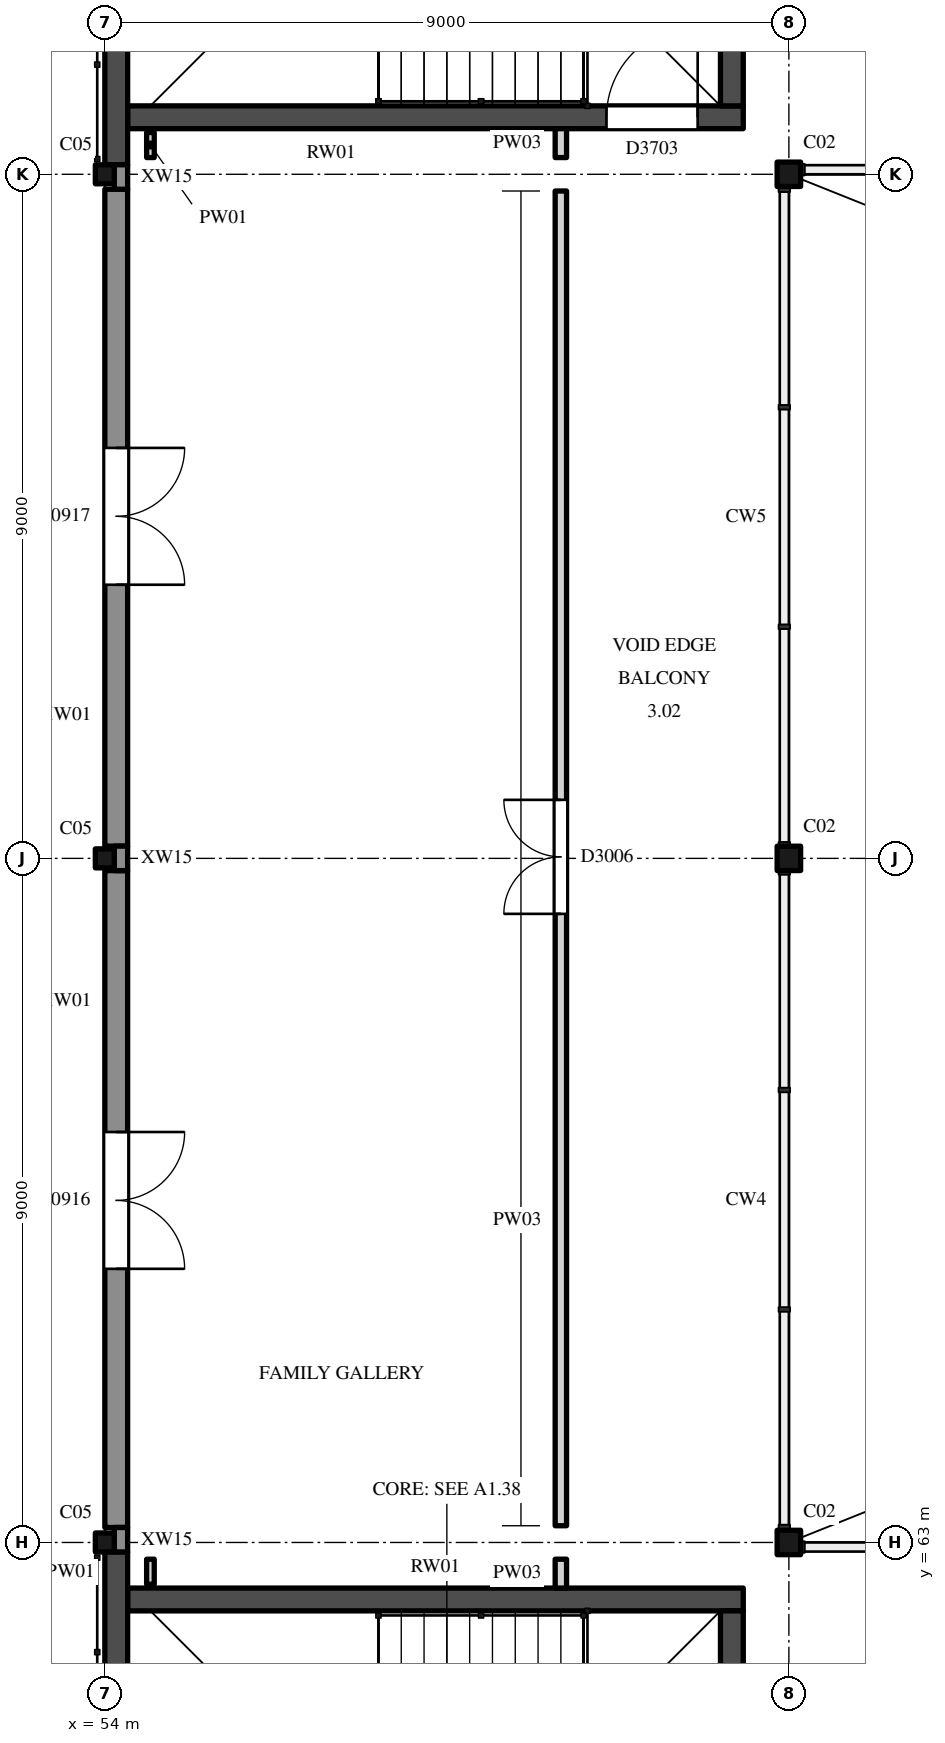
"""IFC4 building model, lengths in metres.
Left out: names, types, materials, properties, quantities, classifications, styles, units other than length and angle.
Written with IfcOpenShell. Run it as: python <this file> out.ifc"""

import sys

from ifc_helpers import new_model, si_unit, direction, frame, frame_2d, origin, origin_2d, place, context, subcontext, project, spatial, rectangle, hollow_rectangle, i_section, extrude, element, fill, save


model = new_model("IFC4")
c1 = context("Model", 3, precision=1e-05, world=origin(), true_north=direction((0.0, 1.0)))
c2 = subcontext(c1, "Body", "Model", "MODEL_VIEW")
j1 = project(units=[si_unit("LENGTHUNIT", "METRE"), si_unit("PLANEANGLEUNIT", "RADIAN")], contexts=[c1])
p1 = place(None, origin())
s1 = spatial("IfcSite", under=j1, at=p1, CompositionType="ELEMENT")
p2 = place(p1, origin())
s2 = spatial("IfcBuilding", under=s1, at=p2, CompositionType="ELEMENT")
p3 = place(p2, frame((0.0, 0.0, 16.0)))
s3 = spatial("IfcBuildingStorey", under=s2, at=p3, CompositionType="ELEMENT", Elevation=16.0)
p4 = place(p3, frame((54.0, 63.0, 0.0), z_axis=(0.0, 0.0, 1.0), x_axis=(1.0, 0.0, 0.0)))
e1 = element("IfcColumn", 1, at=p4, inside=s3, PredefinedType="COLUMN", context=c2, shape_type="SweptSolid", body=[
    extrude(hollow_rectangle(XDim=0.25, YDim=0.25, WallThickness=0.012, InnerFilletRadius=0.019, OuterFilletRadius=0.031, at=origin_2d()), origin(), (0.0, 0.0, 1.0), 10.0),
])
p5 = place(p3, frame((63.0, 63.0, 0.0), z_axis=(0.0, 0.0, 1.0), x_axis=(1.0, 0.0, 0.0)))
e2 = element("IfcColumn", 2, at=p5, inside=s3, PredefinedType="COLUMN", context=c2, shape_type="SweptSolid", body=[
    extrude(i_section(OverallWidth=0.309, OverallDepth=0.321, WebThickness=0.014, FlangeThickness=0.022, FilletRadius=0.017, at=origin_2d()), origin(), (0.0, 0.0, 1.0), 10.0),
])
p6 = place(p3, frame((54.0, 72.0, 0.0), z_axis=(0.0, 0.0, 1.0), x_axis=(1.0, 0.0, 0.0)))
e3 = element("IfcColumn", 3, at=p6, inside=s3, PredefinedType="COLUMN", context=c2, shape_type="SweptSolid", body=[
    extrude(hollow_rectangle(XDim=0.25, YDim=0.25, WallThickness=0.012, InnerFilletRadius=0.019, OuterFilletRadius=0.031, at=origin_2d()), origin(), (0.0, 0.0, 1.0), 10.0),
])
p7 = place(p3, frame((63.0, 72.0, 0.0), z_axis=(0.0, 0.0, 1.0), x_axis=(1.0, 0.0, 0.0)))
e4 = element("IfcColumn", 4, at=p7, inside=s3, PredefinedType="COLUMN", context=c2, shape_type="SweptSolid", body=[
    extrude(i_section(OverallWidth=0.309, OverallDepth=0.321, WebThickness=0.014, FlangeThickness=0.022, FilletRadius=0.017, at=origin_2d()), origin(), (0.0, 0.0, 1.0), 10.0),
])
p8 = place(p3, frame((54.0, 81.0, 0.0), z_axis=(0.0, 0.0, 1.0), x_axis=(1.0, 0.0, 0.0)))
e5 = element("IfcColumn", 5, at=p8, inside=s3, PredefinedType="COLUMN", context=c2, shape_type="SweptSolid", body=[
    extrude(hollow_rectangle(XDim=0.25, YDim=0.25, WallThickness=0.012, InnerFilletRadius=0.019, OuterFilletRadius=0.031, at=origin_2d()), origin(), (0.0, 0.0, 1.0), 10.0),
])
p9 = place(p3, frame((63.0, 81.0, 0.0), z_axis=(0.0, 0.0, 1.0), x_axis=(1.0, 0.0, 0.0)))
e6 = element("IfcColumn", 6, at=p9, inside=s3, PredefinedType="COLUMN", context=c2, shape_type="SweptSolid", body=[
    extrude(i_section(OverallWidth=0.309, OverallDepth=0.321, WebThickness=0.014, FlangeThickness=0.022, FilletRadius=0.017, at=origin_2d()), origin(), (0.0, 0.0, 1.0), 10.0),
])
p10 = place(p3, frame((54.3, 62.25, 0.0), z_axis=(0.0, 0.0, 1.0), x_axis=(1.0, 0.0, 0.0)))
e7 = element("IfcWall", 7, at=p10, inside=s3, PredefinedType="SHEAR", context=c2, shape_type="SweptSolid", body=[
    extrude(rectangle(XDim=8.1, YDim=0.3, at=frame_2d((4.05, 0.0))), origin(), (0.0, 0.0, 1.0), 10.0),
])
p11 = place(p3, frame((54.15, 54.125, 0.0), z_axis=(0.0, 0.0, 1.0), x_axis=(0.0, 1.0, 0.0)))
e8 = element("IfcWall", 8, at=p11, inside=s3, PredefinedType="SHEAR", context=c2, shape_type="SweptSolid", body=[
    extrude(rectangle(XDim=8.75, YDim=0.3, at=frame_2d((4.375, 0.0))), origin(), (0.0, 0.0, 1.0), 10.0),
])
p12 = place(p3, frame((62.25, 54.3, 0.0), z_axis=(0.0, 0.0, 1.0), x_axis=(0.0, 1.0, 0.0)))
e9 = element("IfcWall", 9, at=p12, inside=s3, PredefinedType="SHEAR", context=c2, shape_type="SweptSolid", body=[
    extrude(rectangle(XDim=7.8, YDim=0.3, at=frame_2d((3.9, 0.0))), origin(), (0.0, 0.0, 1.0), 10.0),
])
p13 = place(p12, frame((3.6, 0.0, 0.0)))
e10 = element("IfcOpeningElement", 10, at=p13, cuts=e9, PredefinedType="OPENING", context=c2, shape_type="SweptSolid", body=[
    extrude(rectangle(XDim=1.2, YDim=2.1, at=frame_2d((0.6, 1.05))), frame((0.0, 0.16, 0.0), z_axis=(0.0, -1.0, 0.0), x_axis=(1.0, 0.0, 0.0)), (0.0, 0.0, 1.0), 0.32),
])
p14 = place(p3, frame((54.3, 81.75, 0.0), z_axis=(0.0, 0.0, 1.0), x_axis=(1.0, 0.0, 0.0)))
e11 = element("IfcWall", 11, at=p14, inside=s3, PredefinedType="SHEAR", context=c2, shape_type="SweptSolid", body=[
    extrude(rectangle(XDim=8.1, YDim=0.3, at=frame_2d((4.05, 0.0))), origin(), (0.0, 0.0, 1.0), 10.0),
])
p15 = place(p14, frame((6.3, 0.0, 0.0)))
e12 = element("IfcOpeningElement", 12, at=p15, cuts=e11, PredefinedType="OPENING", context=c2, shape_type="SweptSolid", body=[
    extrude(rectangle(XDim=1.2, YDim=2.1, at=frame_2d((0.6, 1.05))), frame((0.0, 0.16, 0.0), z_axis=(0.0, -1.0, 0.0), x_axis=(1.0, 0.0, 0.0)), (0.0, 0.0, 1.0), 0.32),
])
p16 = place(p3, frame((54.15, 81.125, 0.0), z_axis=(0.0, 0.0, 1.0), x_axis=(0.0, 1.0, 0.0)))
e13 = element("IfcWall", 13, at=p16, inside=s3, PredefinedType="SHEAR", context=c2, shape_type="SweptSolid", body=[
    extrude(rectangle(XDim=8.711, YDim=0.3, at=frame_2d((4.356, 0.0))), origin(), (0.0, 0.0, 1.0), 10.0),
])
p17 = place(p3, frame((62.25, 81.9, 0.0), z_axis=(0.0, 0.0, 1.0), x_axis=(0.0, 1.0, 0.0)))
e14 = element("IfcWall", 14, at=p17, inside=s3, PredefinedType="SHEAR", context=c2, shape_type="SweptSolid", body=[
    extrude(rectangle(XDim=7.8, YDim=0.3, at=frame_2d((3.9, 0.0))), origin(), (0.0, 0.0, 1.0), 10.0),
])
p18 = place(p17, frame((3.0, 0.0, 0.0)))
e15 = element("IfcOpeningElement", 15, at=p18, cuts=e14, PredefinedType="OPENING", context=c2, shape_type="SweptSolid", body=[
    extrude(rectangle(XDim=1.2, YDim=2.1, at=frame_2d((0.6, 1.05))), frame((0.0, 0.16, 0.0), z_axis=(0.0, -1.0, 0.0), x_axis=(1.0, 0.0, 0.0)), (0.0, 0.0, 1.0), 0.32),
])
p19 = place(p3, frame((54.15, 63.197, 0.0), z_axis=(0.0, 0.0, 1.0), x_axis=(0.0, 1.0, 0.0)))
e16 = element("IfcWall", 16, at=p19, inside=s3, PredefinedType="SOLIDWALL", context=c2, shape_type="SweptSolid", body=[
    extrude(rectangle(XDim=8.642, YDim=0.3, at=frame_2d((4.321, 0.0))), origin(), (0.0, 0.0, 1.0), 9.371),
])
p20 = place(p19, frame((3.403, 0.0, 0.0)))
e17 = element("IfcOpeningElement", 17, at=p20, cuts=e16, PredefinedType="OPENING", context=c2, shape_type="SweptSolid", body=[
    extrude(rectangle(XDim=1.8, YDim=2.1, at=frame_2d((0.9, 1.05))), frame((0.0, 0.16, 0.0), z_axis=(0.0, -1.0, 0.0), x_axis=(1.0, 0.0, 0.0)), (0.0, 0.0, 1.0), 0.32),
])
p21 = place(p3, frame((54.15, 72.161, 0.0), z_axis=(0.0, 0.0, 1.0), x_axis=(0.0, 1.0, 0.0)))
e18 = element("IfcWall", 18, at=p21, inside=s3, PredefinedType="SOLIDWALL", context=c2, shape_type="SweptSolid", body=[
    extrude(rectangle(XDim=8.642, YDim=0.3, at=frame_2d((4.321, 0.0))), origin(), (0.0, 0.0, 1.0), 9.371),
])
p22 = place(p21, frame((3.439, 0.0, 0.0)))
e19 = element("IfcOpeningElement", 19, at=p22, cuts=e18, PredefinedType="OPENING", context=c2, shape_type="SweptSolid", body=[
    extrude(rectangle(XDim=1.8, YDim=2.1, at=frame_2d((0.9, 1.05))), frame((0.0, 0.16, 0.0), z_axis=(0.0, -1.0, 0.0), x_axis=(1.0, 0.0, 0.0)), (0.0, 0.0, 1.0), 0.32),
])
p23 = place(p3, frame((54.212, 62.875, 0.0), z_axis=(0.0, 0.0, 1.0), x_axis=(0.0, 1.0, 0.0)))
e20 = element("IfcWall", 20, at=p23, inside=s3, PredefinedType="SOLIDWALL", context=c2, shape_type="SweptSolid", body=[
    extrude(rectangle(XDim=0.322, YDim=0.175, at=frame_2d((0.161, 0.0))), origin(), (0.0, 0.0, 1.0), 10.0),
])
p24 = place(p3, frame((54.212, 71.839, 0.0), z_axis=(0.0, 0.0, 1.0), x_axis=(0.0, 1.0, 0.0)))
e21 = element("IfcWall", 21, at=p24, inside=s3, PredefinedType="SOLIDWALL", context=c2, shape_type="SweptSolid", body=[
    extrude(rectangle(XDim=0.322, YDim=0.175, at=frame_2d((0.161, 0.0))), origin(), (0.0, 0.0, 1.0), 9.371),
])
p25 = place(p3, frame((54.212, 80.803, 0.0), z_axis=(0.0, 0.0, 1.0), x_axis=(0.0, 1.0, 0.0)))
e22 = element("IfcWall", 22, at=p25, inside=s3, PredefinedType="SOLIDWALL", context=c2, shape_type="SweptSolid", body=[
    extrude(rectangle(XDim=0.322, YDim=0.175, at=frame_2d((0.161, 0.0))), origin(), (0.0, 0.0, 1.0), 10.0),
])
for number, where, z_axis, x_axis in (
    (23, (54.6, 62.45, 0.0), (0.0, 0.0, 1.0), (0.0, 1.0, 0.0)),
    (24, (54.6, 81.22, 0.0), (0.0, 0.0, 1.0), (0.0, 1.0, 0.0)),
):
    element("IfcWall", number, at=place(p3, frame(where, z_axis=z_axis, x_axis=x_axis)), inside=s3, PredefinedType="PARTITIONING", context=c2, shape_type="SweptSolid", body=[
        extrude(rectangle(XDim=0.33, YDim=0.1, at=frame_2d((0.165, 0.0))), origin(), (0.0, 0.0, 1.0), 9.825),
    ])
p26 = place(p3, frame((60.0, 62.4, 0.0), z_axis=(0.0, 0.0, 1.0), x_axis=(0.0, 1.0, 0.0)))
e25 = element("IfcWall", 25, at=p26, inside=s3, PredefinedType="PARTITIONING", context=c2, shape_type="SweptSolid", body=[
    extrude(rectangle(XDim=0.38, YDim=0.15, at=frame_2d((0.19, 0.0))), origin(), (0.0, 0.0, 1.0), 9.825),
])
p27 = place(p3, frame((60.0, 63.22, 0.0), z_axis=(0.0, 0.0, 1.0), x_axis=(0.0, 1.0, 0.0)))
e26 = element("IfcWall", 26, at=p27, inside=s3, PredefinedType="PARTITIONING", context=c2, shape_type="SweptSolid", body=[
    extrude(rectangle(XDim=17.56, YDim=0.15, at=frame_2d((8.78, 0.0))), origin(), (0.0, 0.0, 1.0), 9.825),
])
p28 = place(p27, frame((8.05, 0.0, 0.0)))
e27 = element("IfcOpeningElement", 27, at=p28, cuts=e26, PredefinedType="OPENING", context=c2, shape_type="SweptSolid", body=[
    extrude(rectangle(XDim=1.5, YDim=2.4, at=frame_2d((0.75, 1.2))), frame((0.0, 0.085, 0.0), z_axis=(0.0, -1.0, 0.0), x_axis=(1.0, 0.0, 0.0)), (0.0, 0.0, 1.0), 0.17),
])
p29 = place(p3, frame((60.0, 81.22, 0.0), z_axis=(0.0, 0.0, 1.0), x_axis=(0.0, 1.0, 0.0)))
e28 = element("IfcWall", 28, at=p29, inside=s3, PredefinedType="PARTITIONING", context=c2, shape_type="SweptSolid", body=[
    extrude(rectangle(XDim=0.38, YDim=0.15, at=frame_2d((0.19, 0.0))), origin(), (0.0, 0.0, 1.0), 9.825),
])
p30 = place(p15, origin())
e29 = element("IfcDoor", 29, at=p30, inside=s3, OperationType="SINGLE_SWING_LEFT", PredefinedType="DOOR", context=c2, shape_type="SweptSolid", body=[
    extrude(rectangle(XDim=1.2, YDim=2.1, at=frame_2d((0.6, 1.05))), frame((0.0, 0.025, 0.0), z_axis=(0.0, -1.0, 0.0), x_axis=(1.0, 0.0, 0.0)), (0.0, 0.0, 1.0), 0.05),
])
fill(e12, e29)
p31 = place(p20, origin())
e30 = element("IfcDoor", 30, at=p31, inside=s3, OperationType="DOUBLE_DOOR_SINGLE_SWING", PredefinedType="DOOR", context=c2, shape_type="SweptSolid", body=[
    extrude(rectangle(XDim=1.8, YDim=2.1, at=frame_2d((0.9, 1.05))), frame((0.0, 0.025, 0.0), z_axis=(0.0, -1.0, 0.0), x_axis=(1.0, 0.0, 0.0)), (0.0, 0.0, 1.0), 0.05),
])
fill(e17, e30)
p32 = place(p22, origin())
e31 = element("IfcDoor", 31, at=p32, inside=s3, OperationType="DOUBLE_DOOR_SINGLE_SWING", PredefinedType="DOOR", context=c2, shape_type="SweptSolid", body=[
    extrude(rectangle(XDim=1.8, YDim=2.1, at=frame_2d((0.9, 1.05))), frame((0.0, 0.025, 0.0), z_axis=(0.0, -1.0, 0.0), x_axis=(1.0, 0.0, 0.0)), (0.0, 0.0, 1.0), 0.05),
])
fill(e19, e31)
p33 = place(p28, origin())
e32 = element("IfcDoor", 32, at=p33, inside=s3, OperationType="DOUBLE_DOOR_SINGLE_SWING", PredefinedType="DOOR", context=c2, shape_type="SweptSolid", body=[
    extrude(rectangle(XDim=1.5, YDim=2.4, at=frame_2d((0.75, 1.2))), frame((0.0, 0.025, 0.0), z_axis=(0.0, -1.0, 0.0), x_axis=(1.0, 0.0, 0.0)), (0.0, 0.0, 1.0), 0.05),
])
fill(e27, e32)
save(model, sys.argv[1])
